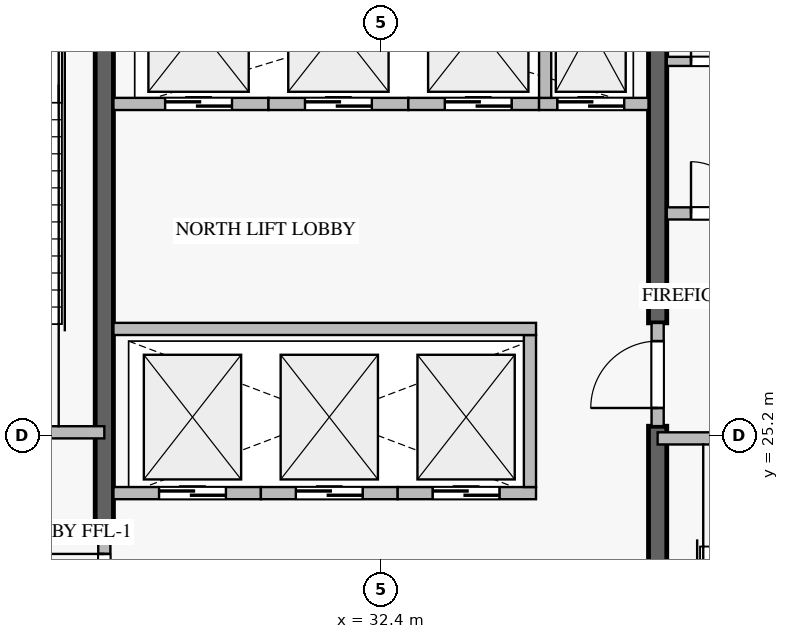
"""IFC4 building model, lengths in metres.
Left out: names, types, materials, properties, quantities, classifications, styles, units other than length and angle.
Written with IfcOpenShell. Run it as: python <this file> out.ifc"""

import sys

from ifc_helpers import new_model, si_unit, direction, frame, frame_2d, origin, place, context, subcontext, project, spatial, rectangle, extrude, source, transform, mapped, element, fill, save


model = new_model("IFC4")
c1 = context("Model", 3, precision=1e-05, world=origin(), true_north=direction((0.0, 1.0)))
c2 = subcontext(c1, "Body", "Model", "MODEL_VIEW")
j1 = project(units=[si_unit("LENGTHUNIT", "METRE"), si_unit("PLANEANGLEUNIT", "RADIAN")], contexts=[c1])
p1 = place(None, origin())
s1 = spatial("IfcSite", under=j1, at=p1, CompositionType="ELEMENT")
p2 = place(p1, origin())
s2 = spatial("IfcBuilding", under=s1, at=p2, CompositionType="ELEMENT")
p3 = place(p2, frame((0.0, 0.0, 115.2)))
s3 = spatial("IfcBuildingStorey", under=s2, at=p3, CompositionType="ELEMENT", Elevation=115.2)
p4 = place(p3, frame((27.85, 23.55, -0.36), z_axis=(0.0, 0.0, 1.0), x_axis=(0.0, 1.0, 0.0)))
e1 = element("IfcWall", 1, at=p4, inside=s3, PredefinedType="SHEAR", context=c2, shape_type="SweptSolid", body=[
    extrude(rectangle(XDim=9.85, YDim=0.3, at=frame_2d((4.925, 0.0))), origin(), (0.0, 0.0, 1.0), 4.868),
])
p5 = place(p3, frame((36.95, 17.0, -0.36), z_axis=(0.0, 0.0, 1.0), x_axis=(0.0, 1.0, 0.0)))
e2 = element("IfcWall", 2, at=p5, inside=s3, PredefinedType="SHEAR", context=c2, shape_type="SweptSolid", body=[
    extrude(rectangle(XDim=8.35, YDim=0.3, at=frame_2d((4.175, 0.0))), origin(), (0.0, 0.0, 1.0), 4.868),
])
p6 = place(p3, frame((36.95, 27.05, -0.36), z_axis=(0.0, 0.0, 1.0), x_axis=(0.0, 1.0, 0.0)))
e3 = element("IfcWall", 3, at=p6, inside=s3, PredefinedType="SHEAR", context=c2, shape_type="SweptSolid", body=[
    extrude(rectangle(XDim=6.35, YDim=0.3, at=frame_2d((3.175, 0.0))), origin(), (0.0, 0.0, 1.0), 4.868),
])
p7 = place(p3, frame((23.4, 25.25, 0.0), z_axis=(0.0, 0.0, 1.0), x_axis=(1.0, 0.0, 0.0)))
e4 = element("IfcWall", 4, at=p7, inside=s3, PredefinedType="STANDARD", context=c2, shape_type="SweptSolid", body=[
    extrude(rectangle(XDim=4.45, YDim=0.2, at=frame_2d((2.225, 0.0))), origin(), (0.0, 0.0, 1.0), 4.51),
])
p8 = place(p7, frame((1.65, 0.0, 0.0)))
e5 = element("IfcOpeningElement", 5, at=p8, cuts=e4, PredefinedType="OPENING", context=c2, shape_type="SweptSolid", body=[
    extrude(rectangle(XDim=1.1, YDim=2.15, at=frame_2d((0.55, 1.075))), frame((0.0, 0.11, 0.0), z_axis=(0.0, -1.0, 0.0), x_axis=(1.0, 0.0, 0.0)), (0.0, 0.0, 1.0), 0.22),
])
p9 = place(p3, frame((36.95, 25.15, 0.0), z_axis=(0.0, 0.0, 1.0), x_axis=(1.0, 0.0, 0.0)))
e6 = element("IfcWall", 6, at=p9, inside=s3, PredefinedType="STANDARD", context=c2, shape_type="SweptSolid", body=[
    extrude(rectangle(XDim=4.45, YDim=0.2, at=frame_2d((2.225, 0.0))), origin(), (0.0, 0.0, 1.0), 4.51),
])
p10 = place(p9, frame((1.65, 0.0, 0.0)))
e7 = element("IfcOpeningElement", 7, at=p10, cuts=e6, PredefinedType="OPENING", context=c2, shape_type="SweptSolid", body=[
    extrude(rectangle(XDim=1.1, YDim=2.15, at=frame_2d((0.55, 1.075))), frame((0.0, 0.11, 0.0), z_axis=(0.0, -1.0, 0.0), x_axis=(1.0, 0.0, 0.0)), (0.0, 0.0, 1.0), 0.22),
])
p11 = place(p3, frame((28.0, 24.25, 0.0), z_axis=(0.0, 0.0, 1.0), x_axis=(1.0, 0.0, 0.0)))
e8 = element("IfcWall", 8, at=p11, inside=s3, PredefinedType="STANDARD", context=c2, shape_type="SweptSolid", body=[
    extrude(rectangle(XDim=2.425, YDim=0.2, at=frame_2d((1.212, 0.0))), origin(), (0.0, 0.0, 1.0), 4.51),
])
p12 = place(p11, frame((0.75, 0.0, 0.0)))
e9 = element("IfcOpeningElement", 9, at=p12, cuts=e8, PredefinedType="OPENING", context=c2, shape_type="SweptSolid", body=[
    extrude(rectangle(XDim=1.1, YDim=2.2, at=frame_2d((0.55, 1.1))), frame((0.0, 0.11, 0.0), z_axis=(0.0, -1.0, 0.0), x_axis=(1.0, 0.0, 0.0)), (0.0, 0.0, 1.0), 0.22),
])
p13 = place(p3, frame((30.425, 24.25, 0.0), z_axis=(0.0, 0.0, 1.0), x_axis=(1.0, 0.0, 0.0)))
e10 = element("IfcWall", 10, at=p13, inside=s3, PredefinedType="STANDARD", context=c2, shape_type="SweptSolid", body=[
    extrude(rectangle(XDim=2.25, YDim=0.2, at=frame_2d((1.125, 0.0))), origin(), (0.0, 0.0, 1.0), 4.51),
])
p14 = place(p13, frame((0.575, 0.0, 0.0)))
e11 = element("IfcOpeningElement", 11, at=p14, cuts=e10, PredefinedType="OPENING", context=c2, shape_type="SweptSolid", body=[
    extrude(rectangle(XDim=1.1, YDim=2.2, at=frame_2d((0.55, 1.1))), frame((0.0, 0.11, 0.0), z_axis=(0.0, -1.0, 0.0), x_axis=(1.0, 0.0, 0.0)), (0.0, 0.0, 1.0), 0.22),
])
p15 = place(p3, frame((32.675, 24.25, 0.0), z_axis=(0.0, 0.0, 1.0), x_axis=(1.0, 0.0, 0.0)))
e12 = element("IfcWall", 12, at=p15, inside=s3, PredefinedType="STANDARD", context=c2, shape_type="SweptSolid", body=[
    extrude(rectangle(XDim=2.275, YDim=0.2, at=frame_2d((1.137, 0.0))), origin(), (0.0, 0.0, 1.0), 4.51),
])
p16 = place(p15, frame((0.575, 0.0, 0.0)))
e13 = element("IfcOpeningElement", 13, at=p16, cuts=e12, PredefinedType="OPENING", context=c2, shape_type="SweptSolid", body=[
    extrude(rectangle(XDim=1.1, YDim=2.2, at=frame_2d((0.55, 1.1))), frame((0.0, 0.11, 0.0), z_axis=(0.0, -1.0, 0.0), x_axis=(1.0, 0.0, 0.0)), (0.0, 0.0, 1.0), 0.22),
])
p17 = place(p3, frame((34.85, 24.35, 0.0), z_axis=(0.0, 0.0, 1.0), x_axis=(0.0, 1.0, 0.0)))
e14 = element("IfcWall", 14, at=p17, inside=s3, PredefinedType="STANDARD", context=c2, shape_type="SweptSolid", body=[
    extrude(rectangle(XDim=2.5, YDim=0.2, at=frame_2d((1.25, 0.0))), origin(), (0.0, 0.0, 1.0), 4.51),
])
p18 = place(p3, frame((28.0, 30.65, 0.0), z_axis=(0.0, 0.0, 1.0), x_axis=(1.0, 0.0, 0.0)))
e15 = element("IfcWall", 15, at=p18, inside=s3, PredefinedType="STANDARD", context=c2, shape_type="SweptSolid", body=[
    extrude(rectangle(XDim=2.55, YDim=0.2, at=frame_2d((1.275, 0.0))), origin(), (0.0, 0.0, 1.0), 4.51),
])
p19 = place(p18, frame((0.85, 0.0, 0.0)))
e16 = element("IfcOpeningElement", 16, at=p19, cuts=e15, PredefinedType="OPENING", context=c2, shape_type="SweptSolid", body=[
    extrude(rectangle(XDim=1.1, YDim=2.2, at=frame_2d((0.55, 1.1))), frame((0.0, 0.11, 0.0), z_axis=(0.0, -1.0, 0.0), x_axis=(1.0, 0.0, 0.0)), (0.0, 0.0, 1.0), 0.22),
])
p20 = place(p3, frame((30.55, 30.65, 0.0), z_axis=(0.0, 0.0, 1.0), x_axis=(1.0, 0.0, 0.0)))
e17 = element("IfcWall", 17, at=p20, inside=s3, PredefinedType="STANDARD", context=c2, shape_type="SweptSolid", body=[
    extrude(rectangle(XDim=2.3, YDim=0.2, at=frame_2d((1.15, 0.0))), origin(), (0.0, 0.0, 1.0), 4.51),
])
p21 = place(p20, frame((0.6, 0.0, 0.0)))
e18 = element("IfcOpeningElement", 18, at=p21, cuts=e17, PredefinedType="OPENING", context=c2, shape_type="SweptSolid", body=[
    extrude(rectangle(XDim=1.1, YDim=2.2, at=frame_2d((0.55, 1.1))), frame((0.0, 0.11, 0.0), z_axis=(0.0, -1.0, 0.0), x_axis=(1.0, 0.0, 0.0)), (0.0, 0.0, 1.0), 0.22),
])
p22 = place(p3, frame((32.85, 30.65, 0.0), z_axis=(0.0, 0.0, 1.0), x_axis=(1.0, 0.0, 0.0)))
e19 = element("IfcWall", 19, at=p22, inside=s3, PredefinedType="STANDARD", context=c2, shape_type="SweptSolid", body=[
    extrude(rectangle(XDim=2.15, YDim=0.2, at=frame_2d((1.075, 0.0))), origin(), (0.0, 0.0, 1.0), 4.51),
])
p23 = place(p22, frame((0.6, 0.0, 0.0)))
e20 = element("IfcOpeningElement", 20, at=p23, cuts=e19, PredefinedType="OPENING", context=c2, shape_type="SweptSolid", body=[
    extrude(rectangle(XDim=1.1, YDim=2.2, at=frame_2d((0.55, 1.1))), frame((0.0, 0.11, 0.0), z_axis=(0.0, -1.0, 0.0), x_axis=(1.0, 0.0, 0.0)), (0.0, 0.0, 1.0), 0.22),
])
p24 = place(p3, frame((35.0, 30.65, 0.0), z_axis=(0.0, 0.0, 1.0), x_axis=(1.0, 0.0, 0.0)))
e21 = element("IfcWall", 21, at=p24, inside=s3, PredefinedType="STANDARD", context=c2, shape_type="SweptSolid", body=[
    extrude(rectangle(XDim=1.8, YDim=0.2, at=frame_2d((0.9, 0.0))), origin(), (0.0, 0.0, 1.0), 4.51),
])
p25 = place(p24, frame((0.3, 0.0, 0.0)))
e22 = element("IfcOpeningElement", 22, at=p25, cuts=e21, PredefinedType="OPENING", context=c2, shape_type="SweptSolid", body=[
    extrude(rectangle(XDim=1.1, YDim=2.2, at=frame_2d((0.55, 1.1))), frame((0.0, 0.11, 0.0), z_axis=(0.0, -1.0, 0.0), x_axis=(1.0, 0.0, 0.0)), (0.0, 0.0, 1.0), 0.22),
])
p26 = place(p3, frame((35.1, 30.75, 0.0), z_axis=(0.0, 0.0, 1.0), x_axis=(0.0, 1.0, 0.0)))
e23 = element("IfcWall", 23, at=p26, inside=s3, PredefinedType="STANDARD", context=c2, shape_type="SweptSolid", body=[
    extrude(rectangle(XDim=2.65, YDim=0.2, at=frame_2d((1.325, 0.0))), origin(), (0.0, 0.0, 1.0), 4.51),
])
p27 = place(p3, frame((37.1, 28.85, 0.0), z_axis=(0.0, 0.0, 1.0), x_axis=(1.0, 0.0, 0.0)))
e24 = element("IfcWall", 24, at=p27, inside=s3, PredefinedType="STANDARD", context=c2, shape_type="SweptSolid", body=[
    extrude(rectangle(XDim=1.648, YDim=0.2, at=frame_2d((0.824, 0.0))), origin(), (0.0, 0.0, 1.0), 4.51),
])
p28 = place(p27, frame((0.399, 0.0, 0.0)))
e25 = element("IfcOpeningElement", 25, at=p28, cuts=e24, PredefinedType="OPENING", context=c2, shape_type="SweptSolid", body=[
    extrude(rectangle(XDim=0.85, YDim=2.1, at=frame_2d((0.425, 1.05))), frame((0.0, 0.11, 0.0), z_axis=(0.0, -1.0, 0.0), x_axis=(1.0, 0.0, 0.0)), (0.0, 0.0, 1.0), 0.22),
])
p29 = place(p3, frame((27.85, 21.852, 0.0), z_axis=(0.0, 0.0, 1.0), x_axis=(0.0, 1.0, 0.0)))
e26 = element("IfcWall", 26, at=p29, inside=s3, PredefinedType="STANDARD", context=c2, shape_type="SweptSolid", body=[
    extrude(rectangle(XDim=1.696, YDim=0.2, at=frame_2d((0.848, 0.0))), origin(), (0.0, 0.0, 1.0), 4.51),
])
p30 = place(p29, frame((0.298, 0.0, 0.0)))
e27 = element("IfcOpeningElement", 27, at=p30, cuts=e26, PredefinedType="OPENING", context=c2, shape_type="SweptSolid", body=[
    extrude(rectangle(XDim=1.1, YDim=2.15, at=frame_2d((0.55, 1.075))), frame((0.0, 0.11, 0.0), z_axis=(0.0, -1.0, 0.0), x_axis=(1.0, 0.0, 0.0)), (0.0, 0.0, 1.0), 0.22),
])
p31 = place(p3, frame((36.95, 25.352, 0.0), z_axis=(0.0, 0.0, 1.0), x_axis=(0.0, 1.0, 0.0)))
e28 = element("IfcWall", 28, at=p31, inside=s3, PredefinedType="STANDARD", context=c2, shape_type="SweptSolid", body=[
    extrude(rectangle(XDim=1.696, YDim=0.2, at=frame_2d((0.848, 0.0))), origin(), (0.0, 0.0, 1.0), 4.51),
])
p32 = place(p31, frame((0.298, 0.0, 0.0)))
e29 = element("IfcOpeningElement", 29, at=p32, cuts=e28, PredefinedType="OPENING", context=c2, shape_type="SweptSolid", body=[
    extrude(rectangle(XDim=1.1, YDim=2.15, at=frame_2d((0.55, 1.075))), frame((0.0, 0.11, 0.0), z_axis=(0.0, -1.0, 0.0), x_axis=(1.0, 0.0, 0.0)), (0.0, 0.0, 1.0), 0.22),
])
p33 = place(p3, frame((28.0, 26.95, 0.0), z_axis=(0.0, 0.0, 1.0), x_axis=(1.0, 0.0, 0.0)))
e30 = element("IfcWall", 30, at=p33, inside=s3, PredefinedType="STANDARD", context=c2, shape_type="SweptSolid", body=[
    extrude(rectangle(XDim=6.95, YDim=0.2, at=frame_2d((3.475, 0.0))), origin(), (0.0, 0.0, 1.0), 4.51),
])
p34 = place(p3, frame((37.1, 31.35, 0.0), z_axis=(0.0, 0.0, 1.0), x_axis=(1.0, 0.0, 0.0)))
e31 = element("IfcWall", 31, at=p34, inside=s3, PredefinedType="PARTITIONING", context=c2, shape_type="SweptSolid", body=[
    extrude(rectangle(XDim=1.648, YDim=0.15, at=frame_2d((0.824, 0.0))), origin(), (0.0, 0.0, 1.0), 4.51),
])
p35 = place(p34, frame((0.399, 0.0, 0.0)))
e32 = element("IfcOpeningElement", 32, at=p35, cuts=e31, PredefinedType="OPENING", context=c2, shape_type="SweptSolid", body=[
    extrude(rectangle(XDim=0.85, YDim=2.1, at=frame_2d((0.425, 1.05))), frame((0.0, 0.085, 0.0), z_axis=(0.0, -1.0, 0.0), x_axis=(1.0, 0.0, 0.0)), (0.0, 0.0, 1.0), 0.17),
])
m1 = source(origin(), c2, "Body", "SweptSolid", [
    extrude(rectangle(XDim=1.1, YDim=2.2, at=frame_2d((0.55, 1.1))), frame((0.0, 0.025, 0.0), z_axis=(0.0, -1.0, 0.0), x_axis=(1.0, 0.0, 0.0)), (0.0, 0.0, 1.0), 0.05),
])
p36 = place(p12, origin())
e33 = element("IfcDoor", 33, at=p36, inside=s3, OperationType="DOUBLE_DOOR_SLIDING", PredefinedType="DOOR", context=c2, shape_type="MappedRepresentation", body=[
    mapped(m1, transform((0.0, 0.0, 0.0), scale=1.0)),
])
fill(e9, e33)
p37 = place(p14, origin())
e34 = element("IfcDoor", 34, at=p37, inside=s3, OperationType="DOUBLE_DOOR_SLIDING", PredefinedType="DOOR", context=c2, shape_type="MappedRepresentation", body=[
    mapped(m1, transform((0.0, 0.0, 0.0), scale=1.0)),
])
fill(e11, e34)
p38 = place(p16, origin())
e35 = element("IfcDoor", 35, at=p38, inside=s3, OperationType="DOUBLE_DOOR_SLIDING", PredefinedType="DOOR", context=c2, shape_type="MappedRepresentation", body=[
    mapped(m1, transform((0.0, 0.0, 0.0), scale=1.0)),
])
fill(e13, e35)
p39 = place(p19, origin())
e36 = element("IfcDoor", 36, at=p39, inside=s3, OperationType="DOUBLE_DOOR_SLIDING", PredefinedType="DOOR", context=c2, shape_type="MappedRepresentation", body=[
    mapped(m1, transform((0.0, 0.0, 0.0), scale=1.0)),
])
fill(e16, e36)
p40 = place(p21, origin())
e37 = element("IfcDoor", 37, at=p40, inside=s3, OperationType="DOUBLE_DOOR_SLIDING", PredefinedType="DOOR", context=c2, shape_type="MappedRepresentation", body=[
    mapped(m1, transform((0.0, 0.0, 0.0), scale=1.0)),
])
fill(e18, e37)
p41 = place(p23, origin())
e38 = element("IfcDoor", 38, at=p41, inside=s3, OperationType="DOUBLE_DOOR_SLIDING", PredefinedType="DOOR", context=c2, shape_type="MappedRepresentation", body=[
    mapped(m1, transform((0.0, 0.0, 0.0), scale=1.0)),
])
fill(e20, e38)
p42 = place(p25, origin())
e39 = element("IfcDoor", 39, at=p42, inside=s3, OperationType="DOUBLE_DOOR_SLIDING", PredefinedType="DOOR", context=c2, shape_type="MappedRepresentation", body=[
    mapped(m1, transform((0.0, 0.0, 0.0), scale=1.0)),
])
fill(e22, e39)
m2 = source(origin(), c2, "Body", "SweptSolid", [
    extrude(rectangle(XDim=0.85, YDim=2.1, at=frame_2d((0.425, 1.05))), frame((0.0, 0.025, 0.0), z_axis=(0.0, -1.0, 0.0), x_axis=(1.0, 0.0, 0.0)), (0.0, 0.0, 1.0), 0.05),
])
p43 = place(p28, origin())
e40 = element("IfcDoor", 40, at=p43, inside=s3, OperationType="SINGLE_SWING_LEFT", PredefinedType="DOOR", context=c2, shape_type="MappedRepresentation", body=[
    mapped(m2, transform((0.0, 0.0, 0.0), scale=1.0)),
])
fill(e25, e40)
m3 = source(origin(), c2, "Body", "SweptSolid", [
    extrude(rectangle(XDim=1.1, YDim=2.15, at=frame_2d((0.55, 1.075))), frame((0.0, 0.025, 0.0), z_axis=(0.0, -1.0, 0.0), x_axis=(1.0, 0.0, 0.0)), (0.0, 0.0, 1.0), 0.05),
])
p44 = place(p30, origin())
e41 = element("IfcDoor", 41, at=p44, inside=s3, OperationType="SINGLE_SWING_RIGHT", PredefinedType="DOOR", context=c2, shape_type="MappedRepresentation", body=[
    mapped(m3, transform((0.0, 0.0, 0.0), scale=1.0)),
])
fill(e27, e41)
p45 = place(p32, origin())
e42 = element("IfcDoor", 42, at=p45, inside=s3, OperationType="SINGLE_SWING_LEFT", PredefinedType="DOOR", context=c2, shape_type="MappedRepresentation", body=[
    mapped(m3, transform((0.0, 0.0, 0.0), scale=1.0)),
])
fill(e29, e42)
p46 = place(p35, origin())
e43 = element("IfcDoor", 43, at=p46, inside=s3, OperationType="SINGLE_SWING_LEFT", PredefinedType="DOOR", context=c2, shape_type="MappedRepresentation", body=[
    mapped(m2, transform((0.0, 0.0, 0.0), scale=1.0)),
])
fill(e32, e43)
save(model, sys.argv[1])
